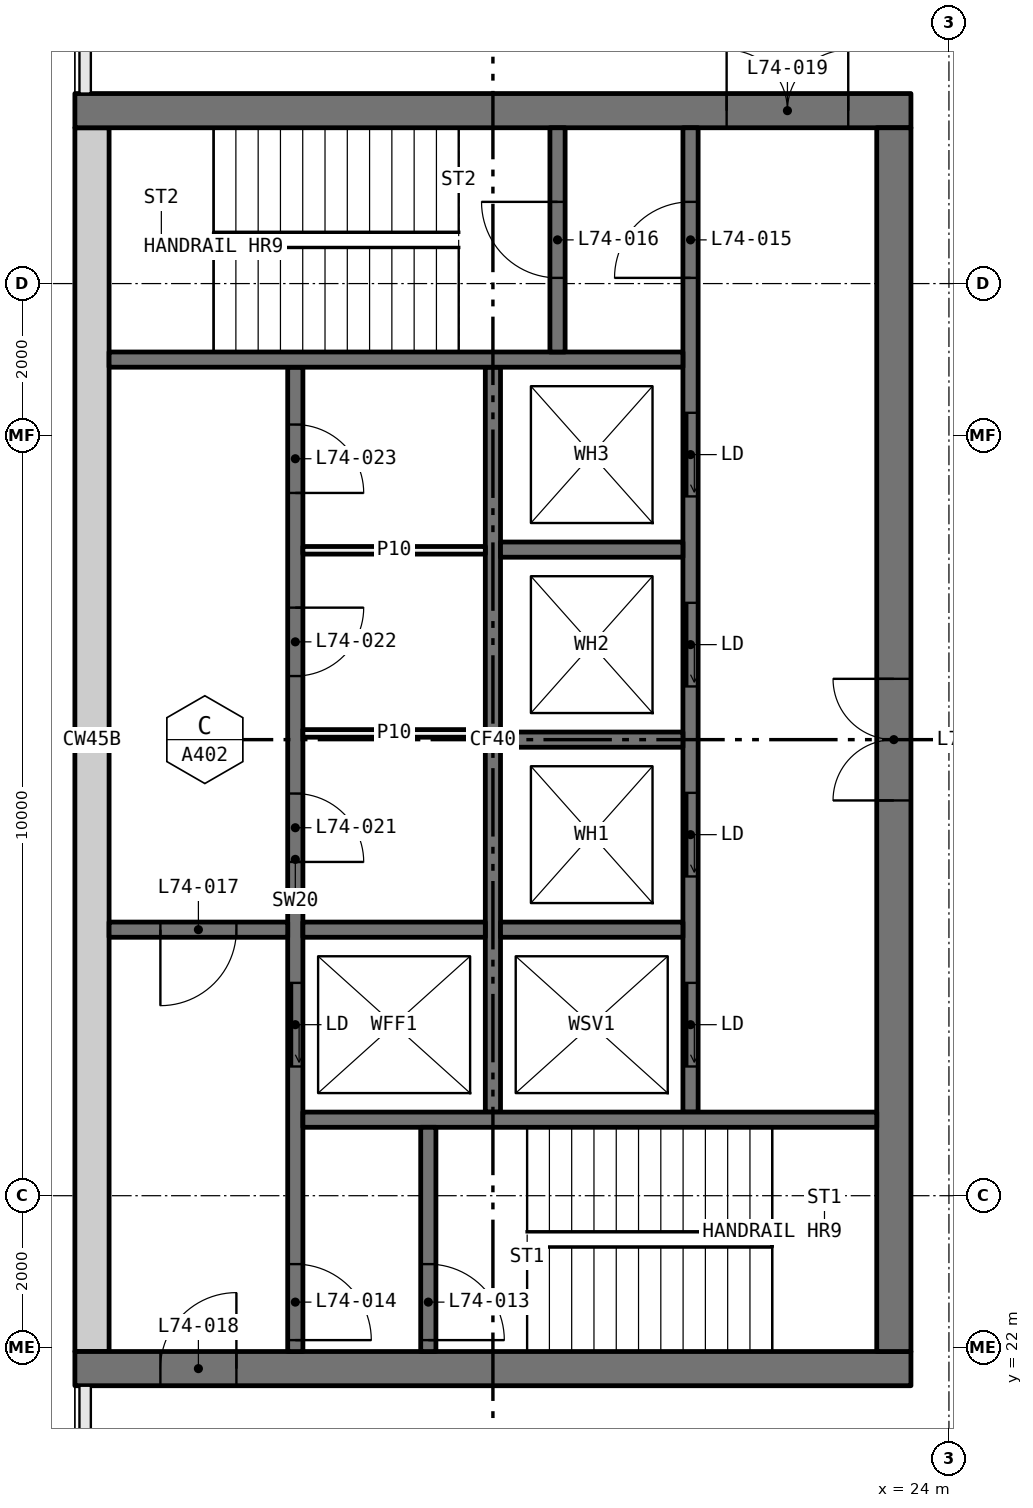
"""IFC4 building model, lengths in metres.
Left out: names, types, materials, properties, quantities, classifications, styles, units other than length and angle.
Written with IfcOpenShell. Run it as: python <this file> out.ifc"""

import sys

from ifc_helpers import new_model, si_unit, direction, frame, frame_2d, origin, place, context, subcontext, project, spatial, rectangle, extrude, element, fill, save


model = new_model("IFC4")
c1 = context("Model", 3, precision=1e-05, world=origin(), true_north=direction((0.0, 1.0)))
c2 = subcontext(c1, "Body", "Model", "MODEL_VIEW")
j1 = project(units=[si_unit("LENGTHUNIT", "METRE"), si_unit("PLANEANGLEUNIT", "RADIAN")], contexts=[c1])
p1 = place(None, origin())
s1 = spatial("IfcSite", under=j1, at=p1, CompositionType="ELEMENT")
p2 = place(p1, origin())
s2 = spatial("IfcBuilding", under=s1, at=p2, CompositionType="ELEMENT")
p3 = place(p2, frame((0.0, 0.0, 273.15)))
s3 = spatial("IfcBuildingStorey", under=s2, at=p3, CompositionType="ELEMENT", Elevation=273.15)
p4 = place(p3, frame((12.5, 21.725, 0.0), z_axis=(0.0, 0.0, 1.0), x_axis=(1.0, 0.0, 0.0)))
e1 = element("IfcWall", 1, at=p4, inside=s3, PredefinedType="SHEAR", context=c2, shape_type="SweptSolid", body=[
    extrude(rectangle(XDim=11.0, YDim=0.45, at=frame_2d((5.5, 0.0))), origin(), (0.0, 0.0, 1.0), 4.4),
])
p5 = place(p4, frame((1.125, 0.0, 0.0)))
e2 = element("IfcOpeningElement", 2, at=p5, cuts=e1, PredefinedType="OPENING", context=c2, shape_type="SweptSolid", body=[
    extrude(rectangle(XDim=1.0, YDim=2.1, at=frame_2d((0.5, 1.05))), frame((0.0, 0.235, 0.0), z_axis=(0.0, -1.0, 0.0), x_axis=(1.0, 0.0, 0.0)), (0.0, 0.0, 1.0), 0.47),
])
p6 = place(p3, frame((12.5, 38.275, 0.0), z_axis=(0.0, 0.0, 1.0), x_axis=(1.0, 0.0, 0.0)))
e3 = element("IfcWall", 3, at=p6, inside=s3, PredefinedType="SHEAR", context=c2, shape_type="SweptSolid", body=[
    extrude(rectangle(XDim=11.0, YDim=0.45, at=frame_2d((5.5, 0.0))), origin(), (0.0, 0.0, 1.0), 4.4),
])
p7 = place(p6, frame((8.575, 0.0, 0.0)))
e4 = element("IfcOpeningElement", 4, at=p7, cuts=e3, PredefinedType="OPENING", context=c2, shape_type="SweptSolid", body=[
    extrude(rectangle(XDim=1.6, YDim=2.1, at=frame_2d((0.8, 1.05))), frame((0.0, 0.235, 0.0), z_axis=(0.0, -1.0, 0.0), x_axis=(1.0, 0.0, 0.0)), (0.0, 0.0, 1.0), 0.47),
])
p8 = place(p3, frame((12.725, 21.95, 0.0), z_axis=(0.0, 0.0, 1.0), x_axis=(0.0, 1.0, 0.0)))
e5 = element("IfcWall", 5, at=p8, inside=s3, PredefinedType="SHEAR", context=c2, shape_type="SweptSolid", body=[
    extrude(rectangle(XDim=16.1, YDim=0.45, at=frame_2d((8.05, 0.0))), origin(), (0.0, 0.0, 1.0), 4.4),
])
p9 = place(p3, frame((23.275, 21.95, 0.0), z_axis=(0.0, 0.0, 1.0), x_axis=(0.0, 1.0, 0.0)))
e6 = element("IfcWall", 6, at=p9, inside=s3, PredefinedType="SHEAR", context=c2, shape_type="SweptSolid", body=[
    extrude(rectangle(XDim=16.1, YDim=0.45, at=frame_2d((8.05, 0.0))), origin(), (0.0, 0.0, 1.0), 4.4),
])
p10 = place(p9, frame((7.25, 0.0, 0.0)))
e7 = element("IfcOpeningElement", 7, at=p10, cuts=e6, PredefinedType="OPENING", context=c2, shape_type="SweptSolid", body=[
    extrude(rectangle(XDim=1.6, YDim=2.1, at=frame_2d((0.8, 1.05))), frame((0.0, 0.235, 0.0), z_axis=(0.0, -1.0, 0.0), x_axis=(1.0, 0.0, 0.0)), (0.0, 0.0, 1.0), 0.47),
])
p11 = place(p3, frame((15.4, 21.95, 0.0), z_axis=(0.0, 0.0, 1.0), x_axis=(0.0, 1.0, 0.0)))
e8 = element("IfcWall", 8, at=p11, inside=s3, PredefinedType="SOLIDWALL", context=c2, shape_type="SweptSolid", body=[
    extrude(rectangle(XDim=12.95, YDim=0.2, at=frame_2d((6.475, 0.0))), origin(), (0.0, 0.0, 1.0), 4.4),
])
p12 = place(p11, frame((3.75, 0.0, 0.0)))
e9 = element("IfcOpeningElement", 9, at=p12, cuts=e8, PredefinedType="OPENING", context=c2, shape_type="SweptSolid", body=[
    extrude(rectangle(XDim=1.1, YDim=2.1, at=frame_2d((0.55, 1.05))), frame((0.0, 0.11, 0.0), z_axis=(0.0, -1.0, 0.0), x_axis=(1.0, 0.0, 0.0)), (0.0, 0.0, 1.0), 0.22),
])
p13 = place(p11, frame((0.15, 0.0, 0.0)))
e10 = element("IfcOpeningElement", 10, at=p13, cuts=e8, PredefinedType="OPENING", context=c2, shape_type="SweptSolid", body=[
    extrude(rectangle(XDim=1.0, YDim=2.1, at=frame_2d((0.5, 1.05))), frame((0.0, 0.11, 0.0), z_axis=(0.0, -1.0, 0.0), x_axis=(1.0, 0.0, 0.0)), (0.0, 0.0, 1.0), 0.22),
])
p14 = place(p11, frame((6.441, 0.0, 0.0)))
e11 = element("IfcOpeningElement", 11, at=p14, cuts=e8, PredefinedType="OPENING", context=c2, shape_type="SweptSolid", body=[
    extrude(rectangle(XDim=0.9, YDim=2.1, at=frame_2d((0.45, 1.05))), frame((0.0, 0.11, 0.0), z_axis=(0.0, -1.0, 0.0), x_axis=(1.0, 0.0, 0.0)), (0.0, 0.0, 1.0), 0.22),
])
p15 = place(p11, frame((8.886, 0.0, 0.0)))
e12 = element("IfcOpeningElement", 12, at=p15, cuts=e8, PredefinedType="OPENING", context=c2, shape_type="SweptSolid", body=[
    extrude(rectangle(XDim=0.9, YDim=2.1, at=frame_2d((0.45, 1.05))), frame((0.0, 0.11, 0.0), z_axis=(0.0, -1.0, 0.0), x_axis=(1.0, 0.0, 0.0)), (0.0, 0.0, 1.0), 0.22),
])
p16 = place(p11, frame((11.295, 0.0, 0.0)))
e13 = element("IfcOpeningElement", 13, at=p16, cuts=e8, PredefinedType="OPENING", context=c2, shape_type="SweptSolid", body=[
    extrude(rectangle(XDim=0.9, YDim=2.1, at=frame_2d((0.45, 1.05))), frame((0.0, 0.11, 0.0), z_axis=(0.0, -1.0, 0.0), x_axis=(1.0, 0.0, 0.0)), (0.0, 0.0, 1.0), 0.22),
])
p17 = place(p3, frame((20.6, 25.1, 0.0), z_axis=(0.0, 0.0, 1.0), x_axis=(0.0, 1.0, 0.0)))
e14 = element("IfcWall", 14, at=p17, inside=s3, PredefinedType="SOLIDWALL", context=c2, shape_type="SweptSolid", body=[
    extrude(rectangle(XDim=12.95, YDim=0.2, at=frame_2d((6.475, 0.0))), origin(), (0.0, 0.0, 1.0), 4.4),
])
p18 = place(p17, frame((0.6, 0.0, 0.0)))
e15 = element("IfcOpeningElement", 15, at=p18, cuts=e14, PredefinedType="OPENING", context=c2, shape_type="SweptSolid", body=[
    extrude(rectangle(XDim=1.1, YDim=2.1, at=frame_2d((0.55, 1.05))), frame((0.0, 0.11, 0.0), z_axis=(0.0, -1.0, 0.0), x_axis=(1.0, 0.0, 0.0)), (0.0, 0.0, 1.0), 0.22),
])
p19 = place(p17, frame((3.1, 0.0, 0.0)))
e16 = element("IfcOpeningElement", 16, at=p19, cuts=e14, PredefinedType="OPENING", context=c2, shape_type="SweptSolid", body=[
    extrude(rectangle(XDim=1.1, YDim=2.1, at=frame_2d((0.55, 1.05))), frame((0.0, 0.11, 0.0), z_axis=(0.0, -1.0, 0.0), x_axis=(1.0, 0.0, 0.0)), (0.0, 0.0, 1.0), 0.22),
])
p20 = place(p17, frame((5.6, 0.0, 0.0)))
e17 = element("IfcOpeningElement", 17, at=p20, cuts=e14, PredefinedType="OPENING", context=c2, shape_type="SweptSolid", body=[
    extrude(rectangle(XDim=1.1, YDim=2.1, at=frame_2d((0.55, 1.05))), frame((0.0, 0.11, 0.0), z_axis=(0.0, -1.0, 0.0), x_axis=(1.0, 0.0, 0.0)), (0.0, 0.0, 1.0), 0.22),
])
p21 = place(p17, frame((8.1, 0.0, 0.0)))
e18 = element("IfcOpeningElement", 18, at=p21, cuts=e14, PredefinedType="OPENING", context=c2, shape_type="SweptSolid", body=[
    extrude(rectangle(XDim=1.1, YDim=2.1, at=frame_2d((0.55, 1.05))), frame((0.0, 0.11, 0.0), z_axis=(0.0, -1.0, 0.0), x_axis=(1.0, 0.0, 0.0)), (0.0, 0.0, 1.0), 0.22),
])
p22 = place(p17, frame((10.975, 0.0, 0.0)))
e19 = element("IfcOpeningElement", 19, at=p22, cuts=e14, PredefinedType="OPENING", context=c2, shape_type="SweptSolid", body=[
    extrude(rectangle(XDim=1.0, YDim=2.1, at=frame_2d((0.5, 1.05))), frame((0.0, 0.11, 0.0), z_axis=(0.0, -1.0, 0.0), x_axis=(1.0, 0.0, 0.0)), (0.0, 0.0, 1.0), 0.22),
])
p23 = place(p3, frame((18.0, 25.1, 0.0), z_axis=(0.0, 0.0, 1.0), x_axis=(0.0, 1.0, 0.0)))
e20 = element("IfcWall", 20, at=p23, inside=s3, PredefinedType="SOLIDWALL", context=c2, shape_type="SweptSolid", body=[
    extrude(rectangle(XDim=9.8, YDim=0.2, at=frame_2d((4.9, 0.0))), origin(), (0.0, 0.0, 1.0), 4.4),
])
for number, where, z_axis, x_axis in (
    (21, (15.5, 25.0, 0.0), (0.0, 0.0, 1.0), (1.0, 0.0, 0.0)),
    (22, (12.95, 35.0, 0.0), (0.0, 0.0, 1.0), (1.0, 0.0, 0.0)),
):
    element("IfcWall", number, at=place(p3, frame(where, z_axis=z_axis, x_axis=x_axis)), inside=s3, PredefinedType="SOLIDWALL", context=c2, shape_type="SweptSolid", body=[
        extrude(rectangle(XDim=7.55, YDim=0.2, at=frame_2d((3.775, 0.0))), origin(), (0.0, 0.0, 1.0), 4.4),
    ])
p24 = place(p3, frame((12.95, 27.5, 0.0), z_axis=(0.0, 0.0, 1.0), x_axis=(1.0, 0.0, 0.0)))
e23 = element("IfcWall", 23, at=p24, inside=s3, PredefinedType="SOLIDWALL", context=c2, shape_type="SweptSolid", body=[
    extrude(rectangle(XDim=2.35, YDim=0.2, at=frame_2d((1.175, 0.0))), origin(), (0.0, 0.0, 1.0), 4.4),
])
p25 = place(p24, frame((0.675, 0.0, 0.0)))
e24 = element("IfcOpeningElement", 24, at=p25, cuts=e23, PredefinedType="OPENING", context=c2, shape_type="SweptSolid", body=[
    extrude(rectangle(XDim=1.0, YDim=2.1, at=frame_2d((0.5, 1.05))), frame((0.0, 0.11, 0.0), z_axis=(0.0, -1.0, 0.0), x_axis=(1.0, 0.0, 0.0)), (0.0, 0.0, 1.0), 0.22),
])
p26 = place(p3, frame((17.15, 21.95, 0.0), z_axis=(0.0, 0.0, 1.0), x_axis=(0.0, 1.0, 0.0)))
e25 = element("IfcWall", 25, at=p26, inside=s3, PredefinedType="SOLIDWALL", context=c2, shape_type="SweptSolid", body=[
    extrude(rectangle(XDim=2.95, YDim=0.2, at=frame_2d((1.475, 0.0))), origin(), (0.0, 0.0, 1.0), 4.4),
])
p27 = place(p26, frame((0.15, 0.0, 0.0)))
e26 = element("IfcOpeningElement", 26, at=p27, cuts=e25, PredefinedType="OPENING", context=c2, shape_type="SweptSolid", body=[
    extrude(rectangle(XDim=1.0, YDim=2.1, at=frame_2d((0.5, 1.05))), frame((0.0, 0.11, 0.0), z_axis=(0.0, -1.0, 0.0), x_axis=(1.0, 0.0, 0.0)), (0.0, 0.0, 1.0), 0.22),
])
p28 = place(p3, frame((18.85, 35.1, 0.0), z_axis=(0.0, 0.0, 1.0), x_axis=(0.0, 1.0, 0.0)))
e27 = element("IfcWall", 27, at=p28, inside=s3, PredefinedType="SOLIDWALL", context=c2, shape_type="SweptSolid", body=[
    extrude(rectangle(XDim=2.95, YDim=0.2, at=frame_2d((1.475, 0.0))), origin(), (0.0, 0.0, 1.0), 4.4),
])
p29 = place(p28, frame((0.975, 0.0, 0.0)))
e28 = element("IfcOpeningElement", 28, at=p29, cuts=e27, PredefinedType="OPENING", context=c2, shape_type="SweptSolid", body=[
    extrude(rectangle(XDim=1.0, YDim=2.1, at=frame_2d((0.5, 1.05))), frame((0.0, 0.11, 0.0), z_axis=(0.0, -1.0, 0.0), x_axis=(1.0, 0.0, 0.0)), (0.0, 0.0, 1.0), 0.22),
])
for number, where, z_axis, x_axis in (
    (29, (15.5, 27.5, 0.0), (0.0, 0.0, 1.0), (1.0, 0.0, 0.0)),
    (30, (18.1, 27.5, 0.0), (0.0, 0.0, 1.0), (1.0, 0.0, 0.0)),
    (31, (18.1, 30.0, 0.0), (0.0, 0.0, 1.0), (1.0, 0.0, 0.0)),
    (32, (18.1, 32.5, 0.0), (0.0, 0.0, 1.0), (1.0, 0.0, 0.0)),
):
    element("IfcWall", number, at=place(p3, frame(where, z_axis=z_axis, x_axis=x_axis)), inside=s3, PredefinedType="SOLIDWALL", context=c2, shape_type="SweptSolid", body=[
        extrude(rectangle(XDim=2.4, YDim=0.2, at=frame_2d((1.2, 0.0))), origin(), (0.0, 0.0, 1.0), 4.4),
    ])
for number, where, z_axis, x_axis in (
    (33, (15.5, 30.082, 0.0), (0.0, 0.0, 1.0), (1.0, 0.0, 0.0)),
    (34, (15.5, 32.491, 0.0), (0.0, 0.0, 1.0), (1.0, 0.0, 0.0)),
):
    element("IfcWall", number, at=place(p3, frame(where, z_axis=z_axis, x_axis=x_axis)), inside=s3, PredefinedType="PARTITIONING", context=c2, shape_type="SweptSolid", body=[
        extrude(rectangle(XDim=2.4, YDim=0.1, at=frame_2d((1.2, 0.0))), origin(), (0.0, 0.0, 1.0), 4.4),
    ])
p30 = place(p18, origin())
e35 = element("IfcDoor", 35, at=p30, inside=s3, OperationType="SLIDING_TO_LEFT", PredefinedType="DOOR", context=c2, shape_type="SweptSolid", body=[
    extrude(rectangle(XDim=1.1, YDim=2.1, at=frame_2d((0.55, 1.05))), frame((0.0, 0.025, 0.0), z_axis=(0.0, -1.0, 0.0), x_axis=(1.0, 0.0, 0.0)), (0.0, 0.0, 1.0), 0.05),
])
fill(e15, e35)
p31 = place(p19, origin())
e36 = element("IfcDoor", 36, at=p31, inside=s3, OperationType="SLIDING_TO_LEFT", PredefinedType="DOOR", context=c2, shape_type="SweptSolid", body=[
    extrude(rectangle(XDim=1.1, YDim=2.1, at=frame_2d((0.55, 1.05))), frame((0.0, 0.025, 0.0), z_axis=(0.0, -1.0, 0.0), x_axis=(1.0, 0.0, 0.0)), (0.0, 0.0, 1.0), 0.05),
])
fill(e16, e36)
p32 = place(p20, origin())
e37 = element("IfcDoor", 37, at=p32, inside=s3, OperationType="SLIDING_TO_LEFT", PredefinedType="DOOR", context=c2, shape_type="SweptSolid", body=[
    extrude(rectangle(XDim=1.1, YDim=2.1, at=frame_2d((0.55, 1.05))), frame((0.0, 0.025, 0.0), z_axis=(0.0, -1.0, 0.0), x_axis=(1.0, 0.0, 0.0)), (0.0, 0.0, 1.0), 0.05),
])
fill(e17, e37)
p33 = place(p21, origin())
e38 = element("IfcDoor", 38, at=p33, inside=s3, OperationType="SLIDING_TO_LEFT", PredefinedType="DOOR", context=c2, shape_type="SweptSolid", body=[
    extrude(rectangle(XDim=1.1, YDim=2.1, at=frame_2d((0.55, 1.05))), frame((0.0, 0.025, 0.0), z_axis=(0.0, -1.0, 0.0), x_axis=(1.0, 0.0, 0.0)), (0.0, 0.0, 1.0), 0.05),
])
fill(e18, e38)
p34 = place(p12, origin())
e39 = element("IfcDoor", 39, at=p34, inside=s3, OperationType="SLIDING_TO_LEFT", PredefinedType="DOOR", context=c2, shape_type="SweptSolid", body=[
    extrude(rectangle(XDim=1.1, YDim=2.1, at=frame_2d((0.55, 1.05))), frame((0.0, 0.025, 0.0), z_axis=(0.0, -1.0, 0.0), x_axis=(1.0, 0.0, 0.0)), (0.0, 0.0, 1.0), 0.05),
])
fill(e9, e39)
p35 = place(p27, frame((1.0, 0.0, 0.0), x_axis=(-1.0, 0.0, 0.0)))
e40 = element("IfcDoor", 40, at=p35, inside=s3, OperationType="SINGLE_SWING_LEFT", PredefinedType="DOOR", context=c2, shape_type="SweptSolid", body=[
    extrude(rectangle(XDim=1.0, YDim=2.1, at=frame_2d((0.5, 1.05))), frame((0.0, 0.025, 0.0), z_axis=(0.0, -1.0, 0.0), x_axis=(1.0, 0.0, 0.0)), (0.0, 0.0, 1.0), 0.05),
])
fill(e26, e40)
p36 = place(p13, frame((1.0, 0.0, 0.0), x_axis=(-1.0, 0.0, 0.0)))
e41 = element("IfcDoor", 41, at=p36, inside=s3, OperationType="SINGLE_SWING_LEFT", PredefinedType="DOOR", context=c2, shape_type="SweptSolid", body=[
    extrude(rectangle(XDim=1.0, YDim=2.1, at=frame_2d((0.5, 1.05))), frame((0.0, 0.025, 0.0), z_axis=(0.0, -1.0, 0.0), x_axis=(1.0, 0.0, 0.0)), (0.0, 0.0, 1.0), 0.05),
])
fill(e10, e41)
p37 = place(p22, origin())
e42 = element("IfcDoor", 42, at=p37, inside=s3, OperationType="SINGLE_SWING_RIGHT", PredefinedType="DOOR", context=c2, shape_type="SweptSolid", body=[
    extrude(rectangle(XDim=1.0, YDim=2.1, at=frame_2d((0.5, 1.05))), frame((0.0, 0.025, 0.0), z_axis=(0.0, -1.0, 0.0), x_axis=(1.0, 0.0, 0.0)), (0.0, 0.0, 1.0), 0.05),
])
fill(e19, e42)
p38 = place(p29, origin())
e43 = element("IfcDoor", 43, at=p38, inside=s3, OperationType="SINGLE_SWING_LEFT", PredefinedType="DOOR", context=c2, shape_type="SweptSolid", body=[
    extrude(rectangle(XDim=1.0, YDim=2.1, at=frame_2d((0.5, 1.05))), frame((0.0, 0.025, 0.0), z_axis=(0.0, -1.0, 0.0), x_axis=(1.0, 0.0, 0.0)), (0.0, 0.0, 1.0), 0.05),
])
fill(e28, e43)
p39 = place(p25, frame((1.0, 0.0, 0.0), x_axis=(-1.0, 0.0, 0.0)))
e44 = element("IfcDoor", 44, at=p39, inside=s3, OperationType="SINGLE_SWING_LEFT", PredefinedType="DOOR", context=c2, shape_type="SweptSolid", body=[
    extrude(rectangle(XDim=1.0, YDim=2.1, at=frame_2d((0.5, 1.05))), frame((0.0, 0.025, 0.0), z_axis=(0.0, -1.0, 0.0), x_axis=(1.0, 0.0, 0.0)), (0.0, 0.0, 1.0), 0.05),
])
fill(e24, e44)
p40 = place(p5, origin())
e45 = element("IfcDoor", 45, at=p40, inside=s3, OperationType="SINGLE_SWING_LEFT", PredefinedType="DOOR", context=c2, shape_type="SweptSolid", body=[
    extrude(rectangle(XDim=1.0, YDim=2.1, at=frame_2d((0.5, 1.05))), frame((0.0, 0.025, 0.0), z_axis=(0.0, -1.0, 0.0), x_axis=(1.0, 0.0, 0.0)), (0.0, 0.0, 1.0), 0.05),
])
fill(e2, e45)
p41 = place(p7, origin())
e46 = element("IfcDoor", 46, at=p41, inside=s3, OperationType="DOUBLE_DOOR_SINGLE_SWING", PredefinedType="DOOR", context=c2, shape_type="SweptSolid", body=[
    extrude(rectangle(XDim=1.6, YDim=2.1, at=frame_2d((0.8, 1.05))), frame((0.0, 0.025, 0.0), z_axis=(0.0, -1.0, 0.0), x_axis=(1.0, 0.0, 0.0)), (0.0, 0.0, 1.0), 0.05),
])
fill(e4, e46)
p42 = place(p10, origin())
e47 = element("IfcDoor", 47, at=p42, inside=s3, OperationType="DOUBLE_DOOR_SINGLE_SWING", PredefinedType="DOOR", context=c2, shape_type="SweptSolid", body=[
    extrude(rectangle(XDim=1.6, YDim=2.1, at=frame_2d((0.8, 1.05))), frame((0.0, 0.025, 0.0), z_axis=(0.0, -1.0, 0.0), x_axis=(1.0, 0.0, 0.0)), (0.0, 0.0, 1.0), 0.05),
])
fill(e7, e47)
p43 = place(p14, frame((0.9, 0.0, 0.0), x_axis=(-1.0, 0.0, 0.0)))
e48 = element("IfcDoor", 48, at=p43, inside=s3, OperationType="SINGLE_SWING_LEFT", PredefinedType="DOOR", context=c2, shape_type="SweptSolid", body=[
    extrude(rectangle(XDim=0.9, YDim=2.1, at=frame_2d((0.45, 1.05))), frame((0.0, 0.025, 0.0), z_axis=(0.0, -1.0, 0.0), x_axis=(1.0, 0.0, 0.0)), (0.0, 0.0, 1.0), 0.05),
])
fill(e11, e48)
p44 = place(p15, frame((0.9, 0.0, 0.0), x_axis=(-1.0, 0.0, 0.0)))
e49 = element("IfcDoor", 49, at=p44, inside=s3, OperationType="SINGLE_SWING_RIGHT", PredefinedType="DOOR", context=c2, shape_type="SweptSolid", body=[
    extrude(rectangle(XDim=0.9, YDim=2.1, at=frame_2d((0.45, 1.05))), frame((0.0, 0.025, 0.0), z_axis=(0.0, -1.0, 0.0), x_axis=(1.0, 0.0, 0.0)), (0.0, 0.0, 1.0), 0.05),
])
fill(e12, e49)
p45 = place(p16, frame((0.9, 0.0, 0.0), x_axis=(-1.0, 0.0, 0.0)))
e50 = element("IfcDoor", 50, at=p45, inside=s3, OperationType="SINGLE_SWING_LEFT", PredefinedType="DOOR", context=c2, shape_type="SweptSolid", body=[
    extrude(rectangle(XDim=0.9, YDim=2.1, at=frame_2d((0.45, 1.05))), frame((0.0, 0.025, 0.0), z_axis=(0.0, -1.0, 0.0), x_axis=(1.0, 0.0, 0.0)), (0.0, 0.0, 1.0), 0.05),
])
fill(e13, e50)
save(model, sys.argv[1])
